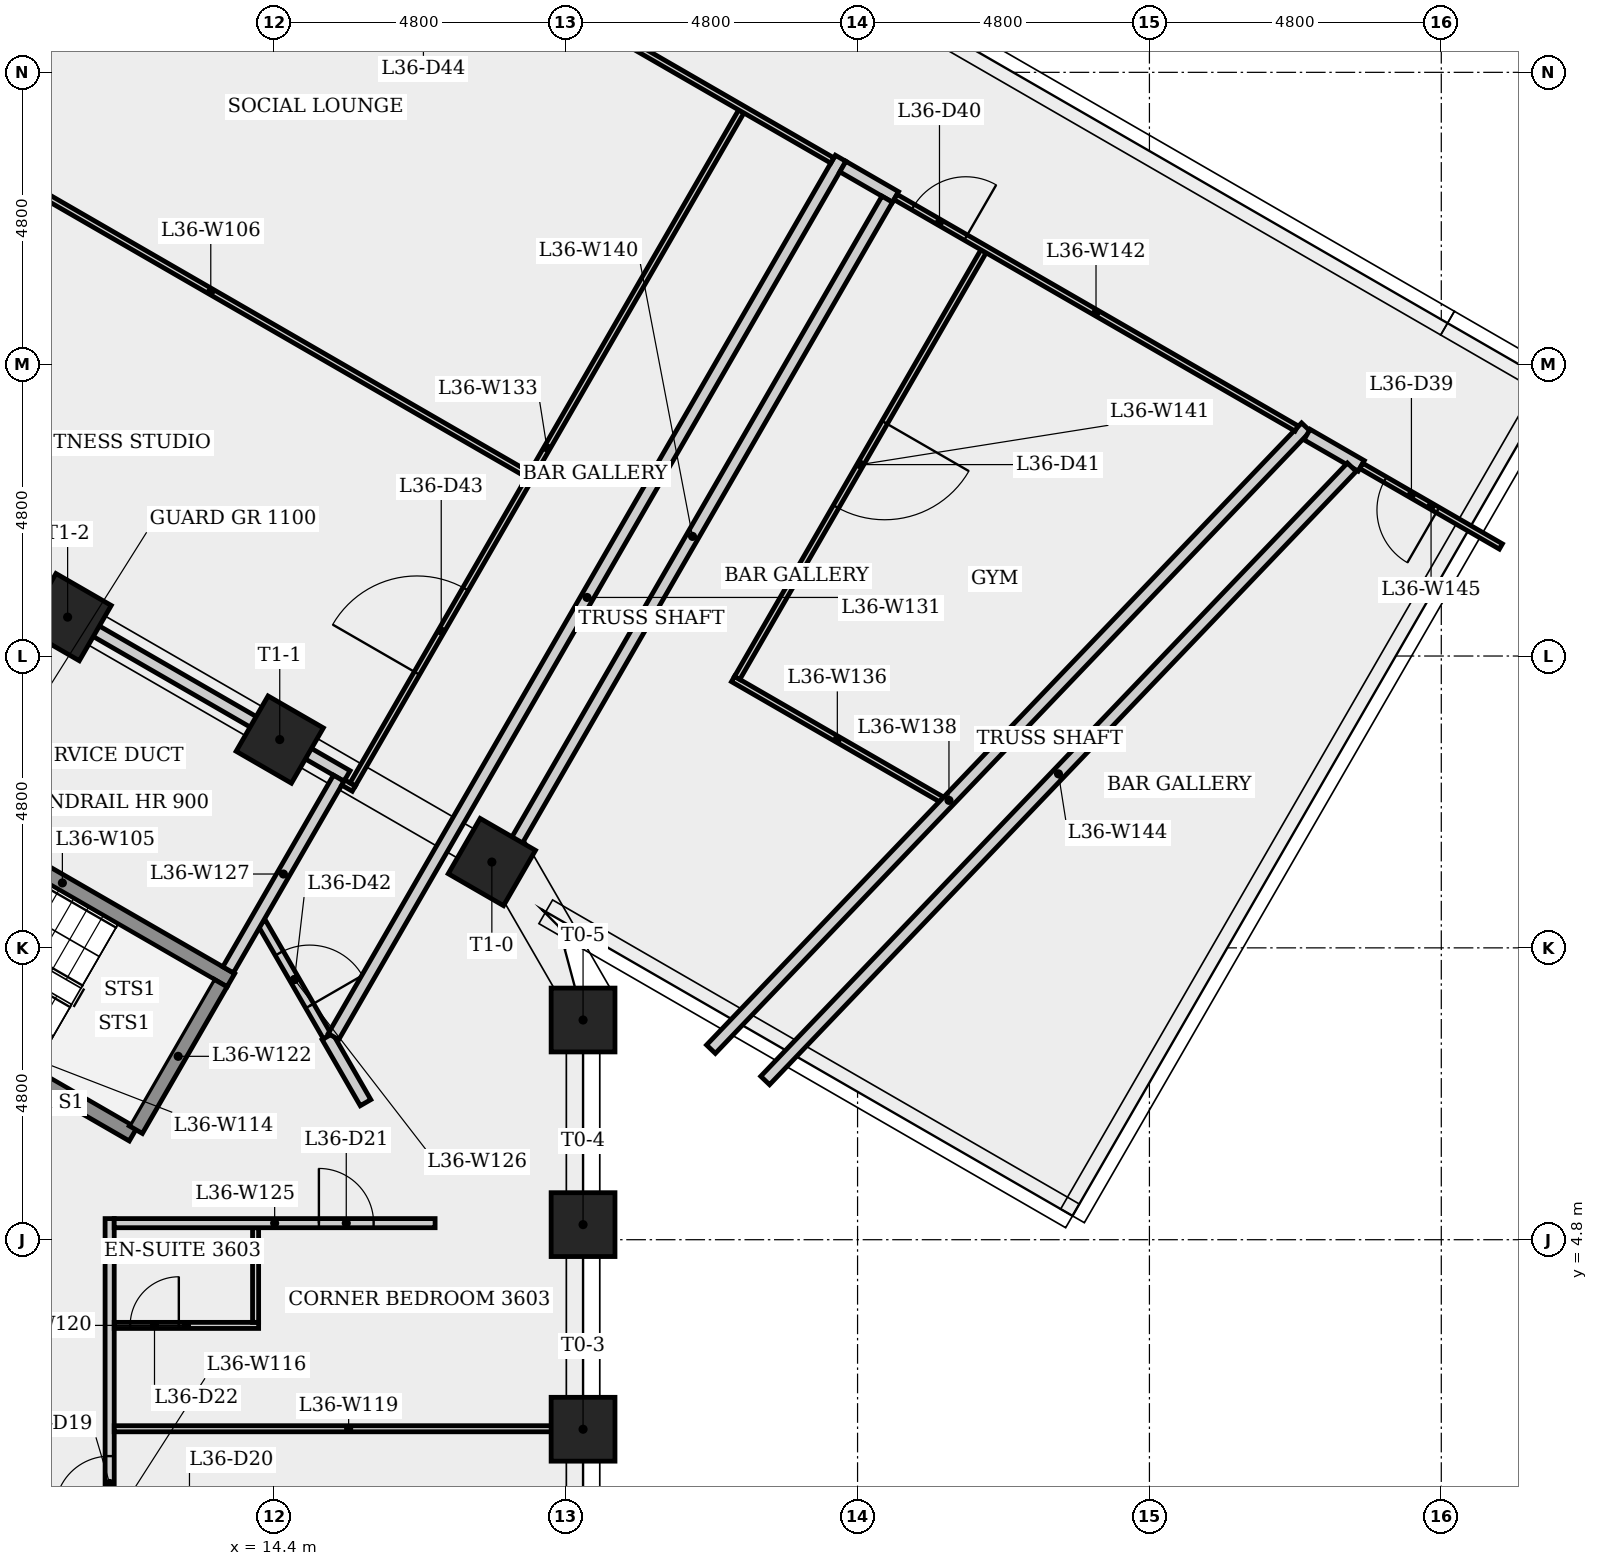
"""IFC4 building model, lengths in metres.
Left out: names, types, materials, properties, quantities, classifications, styles, units other than length and angle.
Written with IfcOpenShell. Run it as: python <this file> out.ifc"""

import sys

from ifc_helpers import new_model, si_unit, direction, frame, frame_2d, origin, origin_2d, place, context, subcontext, project, spatial, rectangle, extrude, element, fill, save


model = new_model("IFC4")
c1 = context("Model", 3, precision=1e-05, world=origin(), true_north=direction((0.0, 1.0)))
c2 = subcontext(c1, "Body", "Model", "MODEL_VIEW")
j1 = project(units=[si_unit("LENGTHUNIT", "METRE"), si_unit("PLANEANGLEUNIT", "RADIAN")], contexts=[c1])
p1 = place(None, origin())
s1 = spatial("IfcSite", under=j1, at=p1, CompositionType="ELEMENT")
p2 = place(p1, origin())
s2 = spatial("IfcBuilding", under=s1, at=p2, CompositionType="ELEMENT")
p3 = place(p2, frame((0.0, 0.0, 135.9)))
s3 = spatial("IfcBuildingStorey", under=s2, at=p3, CompositionType="ELEMENT", Elevation=135.9)
for number, where, z_axis, x_axis in (
    (1, (19.486, 1.683, 0.0), (0.0, 0.0, 1.0), (1.0, 0.0, 0.0)),
    (2, (19.486, 5.048, 0.0), (0.0, 0.0, 1.0), (1.0, 0.0, 0.0)),
    (3, (19.486, 8.413, 0.0), (0.0, 0.0, 1.0), (1.0, 0.0, 0.0)),
    (4, (17.986, 11.011, 0.0), (0.0, 0.0, 1.0), (0.5, 0.866, 0.0)),
    (5, (14.497, 13.026, 0.0), (0.0, 0.0, 1.0), (0.5, 0.866, 0.0)),
    (6, (11.009, 15.04, 0.0), (0.0, 0.0, 1.0), (0.5, 0.866, 0.0)),
):
    element("IfcColumn", number, at=place(p3, frame(where, z_axis=z_axis, x_axis=x_axis)), inside=s3, PredefinedType="COLUMN", context=c2, shape_type="SweptSolid", body=[
        extrude(rectangle(XDim=1.05, YDim=1.05, at=origin_2d()), origin(), (0.0, 0.0, 1.0), 4.0),
    ])
p4 = place(p3, frame((3.133, 19.627, 0.0), z_axis=(0.0, 0.0, 1.0), x_axis=(0.866025783705, -0.499999341958, 0.0)))
e7 = element("IfcWall", 7, at=p4, inside=s3, PredefinedType="PLUMBINGWALL", context=c2, shape_type="SweptSolid", body=[
    extrude(rectangle(XDim=14.4, YDim=0.2, at=frame_2d((7.2, 0.0))), origin(), (0.0, 0.0, 1.0), 2.725),
])
p5 = place(p3, frame((4.352, 19.038, 0.0), z_axis=(0.0, 0.0, 1.0), x_axis=(0.500008481224, 0.866020507092, 0.0)))
e8 = element("IfcWall", 8, at=p5, inside=s3, PredefinedType="PLUMBINGWALL", context=c2, shape_type="SweptSolid", body=[
    extrude(rectangle(XDim=12.758, YDim=0.2, at=frame_2d((6.379, 0.0))), origin(), (0.0, 0.0, 1.0), 3.6),
])
p6 = place(p3, frame((8.151, 12.268, 0.0), z_axis=(0.0, 0.0, 1.0), x_axis=(0.866025499775, -0.499999833739, 0.0)))
e9 = element("IfcWall", 9, at=p6, inside=s3, PredefinedType="SHEAR", context=c2, shape_type="SweptSolid", body=[
    extrude(rectangle(XDim=6.4, YDim=0.25, at=frame_2d((3.2, 0.0))), origin(), (0.0, 0.0, 1.0), 3.6),
])
p7 = place(p3, frame((8.145, 23.408, 0.0), z_axis=(0.0, 0.0, 1.0), x_axis=(0.866032748968, -0.499987277554, 0.0)))
e10 = element("IfcWall", 10, at=p7, inside=s3, PredefinedType="PARTITIONING", context=c2, shape_type="SweptSolid", body=[
    extrude(rectangle(XDim=12.05, YDim=0.1, at=frame_2d((6.025, 0.0))), origin(), (0.0, 0.0, 1.0), 3.6),
])
p8 = place(p3, frame((5.219, 18.538, 0.0), z_axis=(0.0, 0.0, 1.0), x_axis=(0.499994128518, 0.86602879366, 0.0)))
e11 = element("IfcWall", 11, at=p8, inside=s3, PredefinedType="PLUMBINGWALL", context=c2, shape_type="SweptSolid", body=[
    extrude(rectangle(XDim=12.758, YDim=0.2, at=frame_2d((6.379, 0.0))), origin(), (0.0, 0.0, 1.0), 3.6),
])
p9 = place(p3, frame((11.1, 7.101, 0.0), z_axis=(0.0, 0.0, 1.0), x_axis=(-0.8660265141, 0.499998076872, 0.0)))
e12 = element("IfcWall", 12, at=p9, inside=s3, PredefinedType="SHEAR", context=c2, shape_type="SweptSolid", body=[
    extrude(rectangle(XDim=5.137, YDim=0.25, at=frame_2d((2.569, 0.0))), origin(), (0.0, 0.0, 1.0), 3.6),
])
p10 = place(p9, frame((3.987, 0.0, 0.0)))
e13 = element("IfcOpeningElement", 13, at=p10, cuts=e12, PredefinedType="OPENING", context=c2, shape_type="SweptSolid", body=[
    extrude(rectangle(XDim=1.0, YDim=2.1, at=frame_2d((0.5, 1.05))), frame((0.0, 0.135, 0.0), z_axis=(0.0, -1.0, 0.0), x_axis=(1.0, 0.0, 0.0)), (0.0, 0.0, 1.0), 0.27),
])
p11 = place(p3, frame((11.7, -4.997, 0.0), z_axis=(0.0, 0.0, 1.0), x_axis=(0.0, 1.0, 0.0)))
e14 = element("IfcWall", 14, at=p11, inside=s3, PredefinedType="PARTITIONING", context=c2, shape_type="SweptSolid", body=[
    extrude(rectangle(XDim=10.145, YDim=0.15, at=frame_2d((5.072, 0.0))), origin(), (0.0, 0.0, 1.0), 3.6),
])
p12 = place(p11, frame((5.338, 0.0, 0.0)))
e15 = element("IfcOpeningElement", 15, at=p12, cuts=e14, PredefinedType="OPENING", context=c2, shape_type="SweptSolid", body=[
    extrude(rectangle(XDim=0.9, YDim=2.1, at=frame_2d((0.45, 1.05))), frame((0.0, 0.085, 0.0), z_axis=(0.0, -1.0, 0.0), x_axis=(1.0, 0.0, 0.0)), (0.0, 0.0, 1.0), 0.17),
])
p13 = place(p3, frame((11.775, 1.691, 0.0), z_axis=(0.0, 0.0, 1.0), x_axis=(1.0, 0.0, 0.0)))
e16 = element("IfcWall", 16, at=p13, inside=s3, PredefinedType="PARTITIONING", context=c2, shape_type="SweptSolid", body=[
    extrude(rectangle(XDim=7.711, YDim=0.1, at=frame_2d((3.855, 0.0))), origin(), (0.0, 0.0, 1.0), 3.6),
])
p14 = place(p3, frame((11.775, 3.391, 0.0), z_axis=(0.0, 0.0, 1.0), x_axis=(1.0, 0.0, 0.0)))
e17 = element("IfcWall", 17, at=p14, inside=s3, PredefinedType="PARTITIONING", context=c2, shape_type="SweptSolid", body=[
    extrude(rectangle(XDim=2.375, YDim=0.1, at=frame_2d((1.188, 0.0))), origin(), (0.0, 0.0, 1.0), 3.6),
])
p15 = place(p14, frame((0.262, 0.0, 0.0)))
e18 = element("IfcOpeningElement", 18, at=p15, cuts=e17, PredefinedType="OPENING", context=c2, shape_type="SweptSolid", body=[
    extrude(rectangle(XDim=0.8, YDim=2.1, at=frame_2d((0.4, 1.05))), frame((0.0, 0.06, 0.0), z_axis=(0.0, -1.0, 0.0), x_axis=(1.0, 0.0, 0.0)), (0.0, 0.0, 1.0), 0.12),
])
p16 = place(p3, frame((12.085, 6.532, 0.0), z_axis=(0.0, 0.0, 1.0), x_axis=(-0.86604373436, 0.499968249168, 0.0)))
e19 = element("IfcWall", 19, at=p16, inside=s3, PredefinedType="SHEAR", context=c2, shape_type="SweptSolid", body=[
    extrude(rectangle(XDim=1.118, YDim=0.25, at=frame_2d((0.559, 0.0))), origin(), (0.0, 0.0, 1.0), 3.6),
])
p17 = place(p3, frame((13.523, 9.022, 0.0), z_axis=(0.0, 0.0, 1.0), x_axis=(-0.500013277472, -0.866017737897, 0.0)))
e20 = element("IfcWall", 20, at=p17, inside=s3, PredefinedType="SHEAR", context=c2, shape_type="SweptSolid", body=[
    extrude(rectangle(XDim=2.786, YDim=0.25, at=frame_2d((1.393, 0.0))), origin(), (0.0, 0.0, 1.0), 3.6),
])
p18 = place(p3, frame((14.1, 3.441, 0.0), z_axis=(0.0, 0.0, 1.0), x_axis=(0.0, 1.0, 0.0)))
e21 = element("IfcWall", 21, at=p18, inside=s3, PredefinedType="PARTITIONING", context=c2, shape_type="SweptSolid", body=[
    extrude(rectangle(XDim=1.557, YDim=0.1, at=frame_2d((0.778, 0.0))), origin(), (0.0, 0.0, 1.0), 3.6),
])
p19 = place(p3, frame((11.775, 5.072, 0.0), z_axis=(0.0, 0.0, 1.0), x_axis=(1.0, 0.0, 0.0)))
e22 = element("IfcWall", 22, at=p19, inside=s3, PredefinedType="PARTITIONING", context=c2, shape_type="SweptSolid", body=[
    extrude(rectangle(XDim=5.277, YDim=0.15, at=frame_2d((2.639, 0.0))), origin(), (0.0, 0.0, 1.0), 3.6),
])
p20 = place(p19, frame((3.366, 0.0, 0.0)))
e23 = element("IfcOpeningElement", 23, at=p20, cuts=e22, PredefinedType="OPENING", context=c2, shape_type="SweptSolid", body=[
    extrude(rectangle(XDim=0.9, YDim=2.1, at=frame_2d((0.45, 1.05))), frame((0.0, 0.085, 0.0), z_axis=(0.0, -1.0, 0.0), x_axis=(1.0, 0.0, 0.0)), (0.0, 0.0, 1.0), 0.17),
])
p21 = place(p3, frame((14.197, 10.017, 0.0), z_axis=(0.0, 0.0, 1.0), x_axis=(0.500076756895, -0.865981083635, 0.0)))
e24 = element("IfcWall", 24, at=p21, inside=s3, PredefinedType="PARTITIONING", context=c2, shape_type="SweptSolid", body=[
    extrude(rectangle(XDim=2.167, YDim=0.15, at=frame_2d((1.083, 0.0))), origin(), (0.0, 0.0, 1.0), 3.6),
])
p22 = place(p21, frame((0.583, 0.0, 0.0)))
e25 = element("IfcOpeningElement", 25, at=p22, cuts=e24, PredefinedType="OPENING", context=c2, shape_type="SweptSolid", body=[
    extrude(rectangle(XDim=1.0, YDim=2.1, at=frame_2d((0.5, 1.05))), frame((0.0, 0.085, 0.0), z_axis=(0.0, -1.0, 0.0), x_axis=(1.0, 0.0, 0.0)), (0.0, 0.0, 1.0), 0.17),
])
p23 = place(p3, frame((13.648, 9.239, 0.0), z_axis=(0.0, 0.0, 1.0), x_axis=(0.499977996243, 0.866038107287, 0.0)))
e26 = element("IfcWall", 26, at=p23, inside=s3, PredefinedType="PLUMBINGWALL", context=c2, shape_type="SweptSolid", body=[
    extrude(rectangle(XDim=3.639, YDim=0.2, at=frame_2d((1.819, 0.0))), origin(), (0.0, 0.0, 1.0), 3.6),
])
p24 = place(p3, frame((15.281, 8.14, 0.0), z_axis=(0.0, 0.0, 1.0), x_axis=(0.500031220278, -0.866007377998, 0.0)))
e27 = element("IfcWall", 27, at=p24, inside=s3, PredefinedType="PLUMBINGWALL", context=c2, shape_type="SweptSolid", body=[
    extrude(rectangle(XDim=1.255, YDim=0.2, at=frame_2d((0.627, 0.0))), origin(), (0.0, 0.0, 1.0), 3.6),
])
p25 = place(p3, frame((15.381, 8.14, 0.0), z_axis=(0.0, 0.0, 1.0), x_axis=(0.500000327893, 0.866025214475, 0.0)))
e28 = element("IfcWall", 28, at=p25, inside=s3, PredefinedType="PLUMBINGWALL", context=c2, shape_type="SweptSolid", body=[
    extrude(rectangle(XDim=16.681, YDim=0.2, at=frame_2d((8.341, 0.0))), origin(), (0.0, 0.0, 1.0), 3.6),
])
p26 = place(p3, frame((15.542, 12.32, 0.0), z_axis=(0.0, 0.0, 1.0), x_axis=(0.866510491504, -0.499158860599, 0.0)))
e29 = element("IfcWall", 29, at=p26, inside=s3, PredefinedType="PARTITIONING", context=c2, shape_type="SweptSolid", body=[
    extrude(rectangle(XDim=0.2, YDim=0.1, at=frame_2d((0.1, 0.0))), origin(), (0.0, 0.0, 1.0), 3.6),
])
p27 = place(p3, frame((15.697, 12.288, 0.0), z_axis=(0.0, 0.0, 1.0), x_axis=(0.500009610757, 0.86601985494, 0.0)))
e30 = element("IfcWall", 30, at=p27, inside=s3, PredefinedType="PARTITIONING", context=c2, shape_type="SweptSolid", body=[
    extrude(rectangle(XDim=12.781, YDim=0.1, at=frame_2d((6.391, 0.0))), origin(), (0.0, 0.0, 1.0), 3.6),
])
p28 = place(p27, frame((2.112, 0.0, 0.0)))
e31 = element("IfcOpeningElement", 31, at=p28, cuts=e30, PredefinedType="OPENING", context=c2, shape_type="SweptSolid", body=[
    extrude(rectangle(XDim=1.6, YDim=2.1, at=frame_2d((0.8, 1.05))), frame((0.0, 0.06, 0.0), z_axis=(0.0, -1.0, 0.0), x_axis=(1.0, 0.0, 0.0)), (0.0, 0.0, 1.0), 0.12),
])
p29 = place(p3, frame((21.952, 14.021, 0.0), z_axis=(0.0, 0.0, 1.0), x_axis=(0.866027556635, -0.499996271135, 0.0)))
e32 = element("IfcWall", 32, at=p29, inside=s3, PredefinedType="PARTITIONING", context=c2, shape_type="SweptSolid", body=[
    extrude(rectangle(XDim=3.962, YDim=0.1, at=frame_2d((1.981, 0.0))), origin(), (0.0, 0.0, 1.0), 3.6),
])
p30 = place(p3, frame((11.634, 29.45, 0.0), z_axis=(0.0, 0.0, 1.0), x_axis=(0.866025616189, -0.499999632104, 0.0)))
e33 = element("IfcWall", 33, at=p30, inside=s3, PredefinedType="PARTITIONING", context=c2, shape_type="SweptSolid", body=[
    extrude(rectangle(XDim=13.8, YDim=0.1, at=frame_2d((6.9, 0.0))), origin(), (0.0, 0.0, 1.0), 3.6),
])
p31 = place(p30, frame((5.235, 0.0, 0.0)))
e34 = element("IfcOpeningElement", 34, at=p31, cuts=e33, PredefinedType="OPENING", context=c2, shape_type="SweptSolid", body=[
    extrude(rectangle(XDim=1.6, YDim=2.1, at=frame_2d((0.8, 1.05))), frame((0.0, 0.06, 0.0), z_axis=(0.0, -1.0, 0.0), x_axis=(1.0, 0.0, 0.0)), (0.0, 0.0, 1.0), 0.12),
])
p32 = place(p3, frame((21.589, 7.934, 0.0), z_axis=(0.0, 0.0, 1.0), x_axis=(0.691214032361, 0.722650096151, 0.0)))
e35 = element("IfcWall", 35, at=p32, inside=s3, PredefinedType="PLUMBINGWALL", context=c2, shape_type="SweptSolid", body=[
    extrude(rectangle(XDim=14.158, YDim=0.2, at=frame_2d((7.079, 0.0))), origin(), (0.0, 0.0, 1.0), 3.6),
])
p33 = place(p3, frame((23.758, 22.45, 0.0), z_axis=(0.0, 0.0, 1.0), x_axis=(0.866010750942, -0.50002537861, 0.0)))
e36 = element("IfcWall", 36, at=p33, inside=s3, PredefinedType="PLUMBINGWALL", context=c2, shape_type="SweptSolid", body=[
    extrude(rectangle(XDim=1.0, YDim=0.2, at=frame_2d((0.5, 0.0))), origin(), (0.0, 0.0, 1.0), 3.6),
])
p34 = place(p3, frame((24.488, 21.914, 0.0), z_axis=(0.0, 0.0, 1.0), x_axis=(-0.50000571756, -0.866022102725, 0.0)))
e37 = element("IfcWall", 37, at=p34, inside=s3, PredefinedType="PLUMBINGWALL", context=c2, shape_type="SweptSolid", body=[
    extrude(rectangle(XDim=12.807, YDim=0.2, at=frame_2d((6.404, 0.0))), origin(), (0.0, 0.0, 1.0), 3.6),
])
p35 = place(p3, frame((26.071, 21.057, 0.0), z_axis=(0.0, 0.0, 1.0), x_axis=(-0.499995447853, -0.866028031952, 0.0)))
e38 = element("IfcWall", 38, at=p35, inside=s3, PredefinedType="PARTITIONING", context=c2, shape_type="SweptSolid", body=[
    extrude(rectangle(XDim=8.103, YDim=0.1, at=frame_2d((4.051, 0.0))), origin(), (0.0, 0.0, 1.0), 3.6),
])
p36 = place(p35, frame((3.251, 0.0, 0.0)))
e39 = element("IfcOpeningElement", 39, at=p36, cuts=e38, PredefinedType="OPENING", context=c2, shape_type="SweptSolid", body=[
    extrude(rectangle(XDim=1.6, YDim=2.1, at=frame_2d((0.8, 1.05))), frame((0.0, 0.06, 0.0), z_axis=(0.0, -1.0, 0.0), x_axis=(1.0, 0.0, 0.0)), (0.0, 0.0, 1.0), 0.12),
])
p37 = place(p3, frame((24.624, 21.95, 0.0), z_axis=(0.0, 0.0, 1.0), x_axis=(0.866019020569, -0.50001105589, 0.0)))
e40 = element("IfcWall", 40, at=p37, inside=s3, PredefinedType="PARTITIONING", context=c2, shape_type="SweptSolid", body=[
    extrude(rectangle(XDim=7.615, YDim=0.1, at=frame_2d((3.808, 0.0))), origin(), (0.0, 0.0, 1.0), 3.6),
])
p38 = place(p37, frame((0.335, 0.0, 0.0)))
e41 = element("IfcOpeningElement", 41, at=p38, cuts=e40, PredefinedType="OPENING", context=c2, shape_type="SweptSolid", body=[
    extrude(rectangle(XDim=1.0, YDim=2.1, at=frame_2d((0.5, 1.05))), frame((0.0, 0.06, 0.0), z_axis=(0.0, -1.0, 0.0), x_axis=(1.0, 0.0, 0.0)), (0.0, 0.0, 1.0), 0.12),
])
p39 = place(p3, frame((31.392, 18.042, 0.0), z_axis=(0.0, 0.0, 1.0), x_axis=(0.865972333609, -0.500091908976, 0.0)))
e42 = element("IfcWall", 42, at=p39, inside=s3, PredefinedType="PLUMBINGWALL", context=c2, shape_type="SweptSolid", body=[
    extrude(rectangle(XDim=1.03, YDim=0.2, at=frame_2d((0.515, 0.0))), origin(), (0.0, 0.0, 1.0), 3.6),
])
p40 = place(p3, frame((32.128, 17.506, 0.0), z_axis=(0.0, 0.0, 1.0), x_axis=(-0.691207554904, -0.722656291776, 0.0)))
e43 = element("IfcWall", 43, at=p40, inside=s3, PredefinedType="PLUMBINGWALL", context=c2, shape_type="SweptSolid", body=[
    extrude(rectangle(XDim=13.958, YDim=0.2, at=frame_2d((6.979, 0.0))), origin(), (0.0, 0.0, 1.0), 3.6),
])
p41 = place(p3, frame((34.58, 16.202, 0.0), z_axis=(0.0, 0.0, 1.0), x_axis=(-0.866024577697, 0.500001430823, 0.0)))
e44 = element("IfcWall", 44, at=p41, inside=s3, PredefinedType="PARTITIONING", context=c2, shape_type="SweptSolid", body=[
    extrude(rectangle(XDim=2.651, YDim=0.1, at=frame_2d((1.326, 0.0))), origin(), (0.0, 0.0, 1.0), 3.6),
])
p42 = place(p41, frame((1.198, 0.0, 0.0)))
e45 = element("IfcOpeningElement", 45, at=p42, cuts=e44, PredefinedType="OPENING", context=c2, shape_type="SweptSolid", body=[
    extrude(rectangle(XDim=1.0, YDim=2.1, at=frame_2d((0.5, 1.05))), frame((0.0, 0.06, 0.0), z_axis=(0.0, -1.0, 0.0), x_axis=(1.0, 0.0, 0.0)), (0.0, 0.0, 1.0), 0.12),
])
p43 = place(p12, origin())
e46 = element("IfcDoor", 46, at=p43, inside=s3, OperationType="SINGLE_SWING_LEFT", PredefinedType="DOOR", context=c2, shape_type="SweptSolid", body=[
    extrude(rectangle(XDim=0.9, YDim=2.1, at=frame_2d((0.45, 1.05))), frame((0.0, 0.025, 0.0), z_axis=(0.0, -1.0, 0.0), x_axis=(1.0, 0.0, 0.0)), (0.0, 0.0, 1.0), 0.05),
])
fill(e15, e46)
p44 = place(p20, origin())
e47 = element("IfcDoor", 47, at=p44, inside=s3, OperationType="SINGLE_SWING_LEFT", PredefinedType="DOOR", context=c2, shape_type="SweptSolid", body=[
    extrude(rectangle(XDim=0.9, YDim=2.1, at=frame_2d((0.45, 1.05))), frame((0.0, 0.025, 0.0), z_axis=(0.0, -1.0, 0.0), x_axis=(1.0, 0.0, 0.0)), (0.0, 0.0, 1.0), 0.05),
])
fill(e23, e47)
p45 = place(p15, origin())
e48 = element("IfcDoor", 48, at=p45, inside=s3, OperationType="SINGLE_SWING_RIGHT", PredefinedType="DOOR", context=c2, shape_type="SweptSolid", body=[
    extrude(rectangle(XDim=0.8, YDim=2.1, at=frame_2d((0.4, 1.05))), frame((0.0, 0.025, 0.0), z_axis=(0.0, -1.0, 0.0), x_axis=(1.0, 0.0, 0.0)), (0.0, 0.0, 1.0), 0.05),
])
fill(e18, e48)
p46 = place(p42, origin())
e49 = element("IfcDoor", 49, at=p46, inside=s3, OperationType="SINGLE_SWING_LEFT", PredefinedType="DOOR", context=c2, shape_type="SweptSolid", body=[
    extrude(rectangle(XDim=1.0, YDim=2.1, at=frame_2d((0.5, 1.05))), frame((0.0, 0.025, 0.0), z_axis=(0.0, -1.0, 0.0), x_axis=(1.0, 0.0, 0.0)), (0.0, 0.0, 1.0), 0.05),
])
fill(e45, e49)
p47 = place(p38, origin())
e50 = element("IfcDoor", 50, at=p47, inside=s3, OperationType="SINGLE_SWING_RIGHT", PredefinedType="DOOR", context=c2, shape_type="SweptSolid", body=[
    extrude(rectangle(XDim=1.0, YDim=2.1, at=frame_2d((0.5, 1.05))), frame((0.0, 0.025, 0.0), z_axis=(0.0, -1.0, 0.0), x_axis=(1.0, 0.0, 0.0)), (0.0, 0.0, 1.0), 0.05),
])
fill(e41, e50)
p48 = place(p36, origin())
e51 = element("IfcDoor", 51, at=p48, inside=s3, OperationType="SINGLE_SWING_LEFT", PredefinedType="DOOR", context=c2, shape_type="SweptSolid", body=[
    extrude(rectangle(XDim=1.6, YDim=2.1, at=frame_2d((0.8, 1.05))), frame((0.0, 0.025, 0.0), z_axis=(0.0, -1.0, 0.0), x_axis=(1.0, 0.0, 0.0)), (0.0, 0.0, 1.0), 0.05),
])
fill(e39, e51)
p49 = place(p22, origin())
e52 = element("IfcDoor", 52, at=p49, inside=s3, OperationType="SINGLE_SWING_RIGHT", PredefinedType="DOOR", context=c2, shape_type="SweptSolid", body=[
    extrude(rectangle(XDim=1.0, YDim=2.1, at=frame_2d((0.5, 1.05))), frame((0.0, 0.025, 0.0), z_axis=(0.0, -1.0, 0.0), x_axis=(1.0, 0.0, 0.0)), (0.0, 0.0, 1.0), 0.05),
])
fill(e25, e52)
p50 = place(p28, origin())
e53 = element("IfcDoor", 53, at=p50, inside=s3, OperationType="SINGLE_SWING_LEFT", PredefinedType="DOOR", context=c2, shape_type="SweptSolid", body=[
    extrude(rectangle(XDim=1.6, YDim=2.1, at=frame_2d((0.8, 1.05))), frame((0.0, 0.025, 0.0), z_axis=(0.0, -1.0, 0.0), x_axis=(1.0, 0.0, 0.0)), (0.0, 0.0, 1.0), 0.05),
])
fill(e31, e53)
save(model, sys.argv[1])
